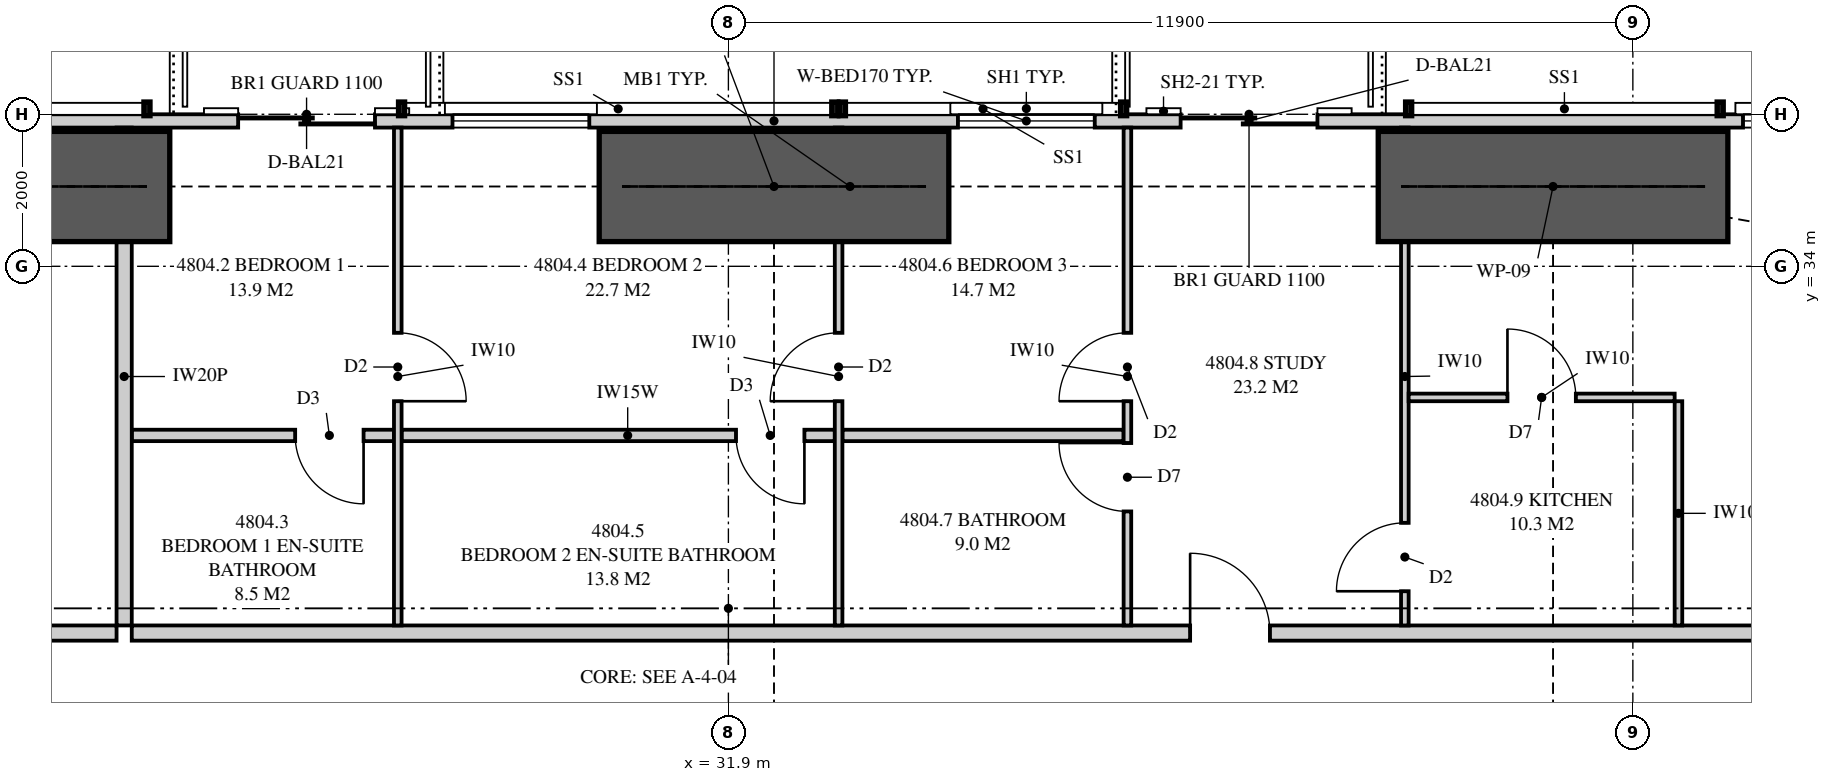
"""IFC4 building model, lengths in metres.
Left out: names, types, materials, properties, quantities, classifications, styles, units other than length and angle.
Written with IfcOpenShell. Run it as: python <this file> out.ifc"""

import sys

from ifc_helpers import new_model, si_unit, direction, frame, frame_2d, origin, place, context, subcontext, project, spatial, polyline, rectangle, outline, extrude, element, fill, save


model = new_model("IFC4")
c1 = context("Model", 3, precision=1e-05, world=origin(), true_north=direction((0.0, 1.0)))
c2 = subcontext(c1, "Body", "Model", "MODEL_VIEW")
j1 = project(units=[si_unit("LENGTHUNIT", "METRE"), si_unit("PLANEANGLEUNIT", "RADIAN")], contexts=[c1])
p1 = place(None, origin())
s1 = spatial("IfcSite", under=j1, at=p1, CompositionType="ELEMENT")
p2 = place(p1, origin())
s2 = spatial("IfcBuilding", under=s1, at=p2, CompositionType="ELEMENT")
p3 = place(p2, frame((0.0, 0.0, 177.8)))
s3 = spatial("IfcBuildingStorey", under=s2, at=p3, CompositionType="ELEMENT", Elevation=177.8)
p4 = place(p3, frame((49.949, 35.913, 0.0), z_axis=(0.0, 0.0, 1.0), x_axis=(-1.0, 0.0, 0.0)))
e1 = element("IfcWall", 1, at=p4, inside=s3, PredefinedType="SOLIDWALL", context=c2, shape_type="SweptSolid", body=[
    extrude(outline(polyline([(0.0, 0.0), (34.897, 0.0), (34.897, 3.11), (27.91, 3.11), (27.91, 2.15), (27.836, 2.15), (27.836, 3.11), (27.699, 3.11), (27.699, 2.15), (7.199, 2.15), (7.199, 3.11), (7.062, 3.11), (7.062, 2.15), (6.987, 2.15), (6.987, 3.11), (0.0, 3.11), (0.0, 0.0)])), frame((0.0, 0.087, 0.0), z_axis=(0.0, -1.0, 0.0), x_axis=(1.0, 0.0, 0.0)), (0.0, 0.0, 1.0), 0.175),
])
p5 = place(p4, frame((2.3, 0.0, 0.4)))
e2 = element("IfcOpeningElement", 2, at=p5, cuts=e1, PredefinedType="OPENING", context=c2, shape_type="SweptSolid", body=[
    extrude(rectangle(XDim=2.4, YDim=1.7, at=frame_2d((1.2, 0.85))), frame((0.0, 0.097, 0.0), z_axis=(0.0, -1.0, 0.0), x_axis=(1.0, 0.0, 0.0)), (0.0, 0.0, 1.0), 0.195),
])
p6 = place(p4, frame((10.299, 0.0, 0.0)))
e3 = element("IfcOpeningElement", 3, at=p6, cuts=e1, PredefinedType="OPENING", context=c2, shape_type="SweptSolid", body=[
    extrude(rectangle(XDim=1.8, YDim=2.1, at=frame_2d((0.9, 1.05))), frame((0.0, 0.097, 0.0), z_axis=(0.0, -1.0, 0.0), x_axis=(1.0, 0.0, 0.0)), (0.0, 0.0, 1.0), 0.195),
])
p7 = place(p4, frame((13.229, 0.0, 0.4)))
e4 = element("IfcOpeningElement", 4, at=p7, cuts=e1, PredefinedType="OPENING", context=c2, shape_type="SweptSolid", body=[
    extrude(rectangle(XDim=1.8, YDim=1.7, at=frame_2d((0.9, 0.85))), frame((0.0, 0.097, 0.0), z_axis=(0.0, -1.0, 0.0), x_axis=(1.0, 0.0, 0.0)), (0.0, 0.0, 1.0), 0.195),
])
p8 = place(p4, frame((19.879, 0.0, 0.4)))
e5 = element("IfcOpeningElement", 5, at=p8, cuts=e1, PredefinedType="OPENING", context=c2, shape_type="SweptSolid", body=[
    extrude(rectangle(XDim=1.8, YDim=1.7, at=frame_2d((0.9, 0.85))), frame((0.0, 0.097, 0.0), z_axis=(0.0, -1.0, 0.0), x_axis=(1.0, 0.0, 0.0)), (0.0, 0.0, 1.0), 0.195),
])
p9 = place(p4, frame((22.699, 0.0, 0.0)))
e6 = element("IfcOpeningElement", 6, at=p9, cuts=e1, PredefinedType="OPENING", context=c2, shape_type="SweptSolid", body=[
    extrude(rectangle(XDim=1.8, YDim=2.1, at=frame_2d((0.9, 1.05))), frame((0.0, 0.097, 0.0), z_axis=(0.0, -1.0, 0.0), x_axis=(1.0, 0.0, 0.0)), (0.0, 0.0, 1.0), 0.195),
])
p10 = place(p4, frame((30.243, 0.0, 0.4)))
e7 = element("IfcOpeningElement", 7, at=p10, cuts=e1, PredefinedType="OPENING", context=c2, shape_type="SweptSolid", body=[
    extrude(rectangle(XDim=1.2, YDim=1.7, at=frame_2d((0.6, 0.85))), frame((0.0, 0.097, 0.0), z_axis=(0.0, -1.0, 0.0), x_axis=(1.0, 0.0, 0.0)), (0.0, 0.0, 1.0), 0.195),
])
p11 = place(p3, frame((23.95, 35.825, 0.0), z_axis=(0.0, 0.0, 1.0), x_axis=(0.0, -1.0, 0.0)))
e8 = element("IfcWall", 8, at=p11, inside=s3, PredefinedType="PARTITIONING", context=c2, shape_type="SweptSolid", body=[
    extrude(outline(polyline([(0.529, 2.15), (0.0, 2.15), (0.0, 0.0), (0.529, 0.0), (0.529, 0.123), (1.021, 0.123), (1.021, 0.0), (6.55, 0.0), (6.55, 3.11), (1.685, 3.11), (1.685, 2.15), (1.021, 2.15), (1.021, 2.027), (0.529, 2.027), (0.529, 2.15)])), frame((0.0, 0.1, 0.0), z_axis=(0.0, -1.0, 0.0), x_axis=(1.0, 0.0, 0.0)), (0.0, 0.0, 1.0), 0.2),
])
p12 = place(p3, frame((17.85, 29.175, 0.0), z_axis=(0.0, 0.0, 1.0), x_axis=(1.0, 0.0, 0.0)))
e9 = element("IfcWall", 9, at=p12, inside=s3, PredefinedType="PARTITIONING", context=c2, shape_type="SweptSolid", body=[
    extrude(outline(polyline([(0.0, 0.0), (6.0, 0.0), (6.0, 3.11), (4.737, 3.11), (4.737, 2.541), (4.062, 2.541), (4.062, 3.11), (0.0, 3.11), (0.0, 0.0)])), frame((0.0, 0.1, 0.0), z_axis=(0.0, -1.0, 0.0), x_axis=(1.0, 0.0, 0.0)), (0.0, 0.0, 1.0), 0.2),
])
p13 = place(p12, frame((2.1, 0.0, 0.0)))
e10 = element("IfcOpeningElement", 10, at=p13, cuts=e9, PredefinedType="OPENING", context=c2, shape_type="SweptSolid", body=[
    extrude(rectangle(XDim=1.8, YDim=2.1, at=frame_2d((0.9, 1.05))), frame((0.0, 0.11, 0.0), z_axis=(0.0, -1.0, 0.0), x_axis=(1.0, 0.0, 0.0)), (0.0, 0.0, 1.0), 0.22),
])
p14 = place(p3, frame((24.05, 29.175, 0.0), z_axis=(0.0, 0.0, 1.0), x_axis=(1.0, 0.0, 0.0)))
e11 = element("IfcWall", 11, at=p14, inside=s3, PredefinedType="PARTITIONING", context=c2, shape_type="SweptSolid", body=[
    extrude(outline(polyline([(0.0, 0.0), (21.9, 0.0), (21.9, 3.11), (19.037, 3.11), (19.037, 2.541), (18.363, 2.541), (18.363, 3.11), (8.787, 3.11), (8.787, 2.541), (8.113, 2.541), (8.113, 3.11), (0.0, 3.11), (0.0, 0.0)])), frame((0.0, 0.1, 0.0), z_axis=(0.0, -1.0, 0.0), x_axis=(1.0, 0.0, 0.0)), (0.0, 0.0, 1.0), 0.2),
])
p15 = place(p14, frame((13.925, 0.0, 0.0)))
e12 = element("IfcOpeningElement", 12, at=p15, cuts=e11, PredefinedType="OPENING", context=c2, shape_type="SweptSolid", body=[
    extrude(rectangle(XDim=1.05, YDim=2.2, at=frame_2d((0.525, 1.1))), frame((0.0, 0.11, 0.0), z_axis=(0.0, -1.0, 0.0), x_axis=(1.0, 0.0, 0.0)), (0.0, 0.0, 1.0), 0.22),
])
p16 = place(p3, frame((27.55, 35.825, 0.0), z_axis=(0.0, 0.0, 1.0), x_axis=(0.0, -1.0, 0.0)))
e13 = element("IfcWall", 13, at=p16, inside=s3, PredefinedType="PARTITIONING", context=c2, shape_type="SweptSolid", body=[
    extrude(outline(polyline([(0.0, 0.0), (6.55, 0.0), (6.55, 3.11), (1.635, 3.11), (1.635, 2.15), (0.0, 2.15), (0.0, 3.11), (0.0, 0.0)])), frame((0.0, 0.05, 0.0), z_axis=(0.0, -1.0, 0.0), x_axis=(1.0, 0.0, 0.0)), (0.0, 0.0, 1.0), 0.1),
])
p17 = place(p16, frame((2.7, 0.0, 0.0)))
e14 = element("IfcOpeningElement", 14, at=p17, cuts=e13, PredefinedType="OPENING", context=c2, shape_type="SweptSolid", body=[
    extrude(rectangle(XDim=0.9, YDim=2.1, at=frame_2d((0.45, 1.05))), frame((0.0, 0.06, 0.0), z_axis=(0.0, -1.0, 0.0), x_axis=(1.0, 0.0, 0.0)), (0.0, 0.0, 1.0), 0.12),
])
p18 = place(p3, frame((33.35, 35.825, 0.0), z_axis=(0.0, 0.0, 1.0), x_axis=(0.0, -1.0, 0.0)))
e15 = element("IfcWall", 15, at=p18, inside=s3, PredefinedType="PARTITIONING", context=c2, shape_type="SweptSolid", body=[
    extrude(outline(polyline([(0.529, 2.15), (0.0, 2.15), (0.0, 0.0), (0.529, 0.0), (0.529, 0.793), (1.021, 0.793), (1.021, 0.0), (6.55, 0.0), (6.55, 3.11), (1.635, 3.11), (1.635, 2.15), (1.021, 2.15), (1.021, 1.357), (0.529, 1.357), (0.529, 2.15)])), frame((0.0, 0.05, 0.0), z_axis=(0.0, -1.0, 0.0), x_axis=(1.0, 0.0, 0.0)), (0.0, 0.0, 1.0), 0.1),
])
p19 = place(p18, frame((2.7, 0.0, 0.0)))
e16 = element("IfcOpeningElement", 16, at=p19, cuts=e15, PredefinedType="OPENING", context=c2, shape_type="SweptSolid", body=[
    extrude(rectangle(XDim=0.9, YDim=2.1, at=frame_2d((0.45, 1.05))), frame((0.0, 0.06, 0.0), z_axis=(0.0, -1.0, 0.0), x_axis=(1.0, 0.0, 0.0)), (0.0, 0.0, 1.0), 0.12),
])
p20 = place(p3, frame((37.15, 35.825, 0.0), z_axis=(0.0, 0.0, 1.0), x_axis=(0.0, -1.0, 0.0)))
e17 = element("IfcWall", 17, at=p20, inside=s3, PredefinedType="PARTITIONING", context=c2, shape_type="SweptSolid", body=[
    extrude(outline(polyline([(0.0, 0.0), (6.55, 0.0), (6.55, 3.11), (1.635, 3.11), (1.635, 2.15), (0.0, 2.15), (0.0, 3.11), (0.0, 0.0)])), frame((0.0, 0.05, 0.0), z_axis=(0.0, -1.0, 0.0), x_axis=(1.0, 0.0, 0.0)), (0.0, 0.0, 1.0), 0.1),
])
p21 = place(p20, frame((2.7, 0.0, 0.0)))
e18 = element("IfcOpeningElement", 18, at=p21, cuts=e17, PredefinedType="OPENING", context=c2, shape_type="SweptSolid", body=[
    extrude(rectangle(XDim=0.9, YDim=2.1, at=frame_2d((0.45, 1.05))), frame((0.0, 0.06, 0.0), z_axis=(0.0, -1.0, 0.0), x_axis=(1.0, 0.0, 0.0)), (0.0, 0.0, 1.0), 0.12),
])
p22 = place(p20, frame((4.15, 0.0, 0.0)))
e19 = element("IfcOpeningElement", 19, at=p22, cuts=e17, PredefinedType="OPENING", context=c2, shape_type="SweptSolid", body=[
    extrude(rectangle(XDim=0.9, YDim=2.1, at=frame_2d((0.45, 1.05))), frame((0.0, 0.06, 0.0), z_axis=(0.0, -1.0, 0.0), x_axis=(1.0, 0.0, 0.0)), (0.0, 0.0, 1.0), 0.12),
])
p23 = place(p3, frame((24.05, 31.775, 0.0), z_axis=(0.0, 0.0, 1.0), x_axis=(1.0, 0.0, 0.0)))
e20 = element("IfcWall", 20, at=p23, inside=s3, PredefinedType="PLUMBINGWALL", context=c2, shape_type="SweptSolid", body=[
    extrude(rectangle(XDim=3.45, YDim=0.15, at=frame_2d((1.725, 0.0))), origin(), (0.0, 0.0, 1.0), 3.11),
])
p24 = place(p23, frame((2.15, 0.0, 0.0)))
e21 = element("IfcOpeningElement", 21, at=p24, cuts=e20, PredefinedType="OPENING", context=c2, shape_type="SweptSolid", body=[
    extrude(rectangle(XDim=0.9, YDim=2.1, at=frame_2d((0.45, 1.05))), frame((0.0, 0.085, 0.0), z_axis=(0.0, -1.0, 0.0), x_axis=(1.0, 0.0, 0.0)), (0.0, 0.0, 1.0), 0.17),
])
p25 = place(p3, frame((27.6, 31.775, 0.0), z_axis=(0.0, 0.0, 1.0), x_axis=(1.0, 0.0, 0.0)))
e22 = element("IfcWall", 22, at=p25, inside=s3, PredefinedType="PLUMBINGWALL", context=c2, shape_type="SweptSolid", body=[
    extrude(outline(polyline([(0.0, 0.0), (5.7, 0.0), (5.7, 3.11), (5.212, 3.11), (5.212, 2.541), (4.588, 2.541), (4.588, 3.11), (0.0, 3.11), (0.0, 0.0)])), frame((0.0, 0.075, 0.0), z_axis=(0.0, -1.0, 0.0), x_axis=(1.0, 0.0, 0.0)), (0.0, 0.0, 1.0), 0.15),
])
p26 = place(p25, frame((4.4, 0.0, 0.0)))
e23 = element("IfcOpeningElement", 23, at=p26, cuts=e22, PredefinedType="OPENING", context=c2, shape_type="SweptSolid", body=[
    extrude(rectangle(XDim=0.9, YDim=2.1, at=frame_2d((0.45, 1.05))), frame((0.0, 0.085, 0.0), z_axis=(0.0, -1.0, 0.0), x_axis=(1.0, 0.0, 0.0)), (0.0, 0.0, 1.0), 0.17),
])
p27 = place(p3, frame((33.4, 31.775, 0.0), z_axis=(0.0, 0.0, 1.0), x_axis=(1.0, 0.0, 0.0)))
e24 = element("IfcWall", 24, at=p27, inside=s3, PredefinedType="PLUMBINGWALL", context=c2, shape_type="SweptSolid", body=[
    extrude(rectangle(XDim=3.7, YDim=0.15, at=frame_2d((1.85, 0.0))), origin(), (0.0, 0.0, 1.0), 3.11),
])
p28 = place(p3, frame((40.8, 35.825, 0.0), z_axis=(0.0, 0.0, 1.0), x_axis=(0.0, -1.0, 0.0)))
e25 = element("IfcWall", 25, at=p28, inside=s3, PredefinedType="PARTITIONING", context=c2, shape_type="SweptSolid", body=[
    extrude(outline(polyline([(0.0, 0.0), (6.55, 0.0), (6.55, 3.11), (1.635, 3.11), (1.635, 2.15), (0.0, 2.15), (0.0, 3.11), (0.0, 0.0)])), frame((0.0, 0.05, 0.0), z_axis=(0.0, -1.0, 0.0), x_axis=(1.0, 0.0, 0.0)), (0.0, 0.0, 1.0), 0.1),
])
p29 = place(p28, frame((5.2, 0.0, 0.0)))
e26 = element("IfcOpeningElement", 26, at=p29, cuts=e25, PredefinedType="OPENING", context=c2, shape_type="SweptSolid", body=[
    extrude(rectangle(XDim=0.9, YDim=2.1, at=frame_2d((0.45, 1.05))), frame((0.0, 0.06, 0.0), z_axis=(0.0, -1.0, 0.0), x_axis=(1.0, 0.0, 0.0)), (0.0, 0.0, 1.0), 0.12),
])
p30 = place(p3, frame((40.85, 32.275, 0.0), z_axis=(0.0, 0.0, 1.0), x_axis=(1.0, 0.0, 0.0)))
e27 = element("IfcWall", 27, at=p30, inside=s3, PredefinedType="PARTITIONING", context=c2, shape_type="SweptSolid", body=[
    extrude(outline(polyline([(0.0, 0.0), (3.5, 0.0), (3.5, 3.11), (2.188, 3.11), (2.188, 2.541), (1.613, 2.541), (1.613, 3.11), (0.0, 3.11), (0.0, 0.0)])), frame((0.0, 0.05, 0.0), z_axis=(0.0, -1.0, 0.0), x_axis=(1.0, 0.0, 0.0)), (0.0, 0.0, 1.0), 0.1),
])
p31 = place(p30, frame((1.3, 0.0, 0.0)))
e28 = element("IfcOpeningElement", 28, at=p31, cuts=e27, PredefinedType="OPENING", context=c2, shape_type="SweptSolid", body=[
    extrude(rectangle(XDim=0.9, YDim=2.1, at=frame_2d((0.45, 1.05))), frame((0.0, 0.06, 0.0), z_axis=(0.0, -1.0, 0.0), x_axis=(1.0, 0.0, 0.0)), (0.0, 0.0, 1.0), 0.12),
])
p32 = place(p3, frame((44.4, 32.225, 0.0), z_axis=(0.0, 0.0, 1.0), x_axis=(0.0, -1.0, 0.0)))
e29 = element("IfcWall", 29, at=p32, inside=s3, PredefinedType="PARTITIONING", context=c2, shape_type="SweptSolid", body=[
    extrude(rectangle(XDim=2.95, YDim=0.1, at=frame_2d((1.475, 0.0))), origin(), (0.0, 0.0, 1.0), 3.11),
])
for number, where, z_axis, x_axis in (
    (30, (40.45, 35.05, 0.0), (0.0, 0.0, 1.0), (1.0, 0.0, 0.0)),
    (31, (30.2, 35.05, 0.0), (0.0, 0.0, 1.0), (1.0, 0.0, 0.0)),
    (32, (19.95, 35.05, 0.0), (0.0, 0.0, 1.0), (1.0, 0.0, 0.0)),
):
    element("IfcWall", number, at=place(p3, frame(where, z_axis=z_axis, x_axis=x_axis)), inside=s3, PredefinedType="SHEAR", context=c2, shape_type="SweptSolid", body=[
        extrude(rectangle(XDim=4.6, YDim=1.45, at=frame_2d((2.3, 0.0))), origin(), (0.0, 0.0, 1.0), 3.35),
    ])
p33 = place(p5, origin())
e33 = element("IfcWindow", 33, at=p33, inside=s3, PartitioningType="SINGLE_PANEL", PredefinedType="WINDOW", context=c2, shape_type="SweptSolid", body=[
    extrude(rectangle(XDim=2.4, YDim=1.7, at=frame_2d((1.2, 0.85))), frame((0.0, 0.03, 0.0), z_axis=(0.0, -1.0, 0.0), x_axis=(1.0, 0.0, 0.0)), (0.0, 0.0, 1.0), 0.06),
])
fill(e2, e33)
p34 = place(p6, origin())
e34 = element("IfcDoor", 34, at=p34, inside=s3, OperationType="SLIDING_TO_LEFT", PredefinedType="DOOR", context=c2, shape_type="SweptSolid", body=[
    extrude(rectangle(XDim=1.8, YDim=2.1, at=frame_2d((0.9, 1.05))), frame((0.0, 0.025, 0.0), z_axis=(0.0, -1.0, 0.0), x_axis=(1.0, 0.0, 0.0)), (0.0, 0.0, 1.0), 0.05),
])
fill(e3, e34)
p35 = place(p7, origin())
e35 = element("IfcWindow", 35, at=p35, inside=s3, PartitioningType="SINGLE_PANEL", PredefinedType="WINDOW", context=c2, shape_type="SweptSolid", body=[
    extrude(rectangle(XDim=1.8, YDim=1.7, at=frame_2d((0.9, 0.85))), frame((0.0, 0.03, 0.0), z_axis=(0.0, -1.0, 0.0), x_axis=(1.0, 0.0, 0.0)), (0.0, 0.0, 1.0), 0.06),
])
fill(e4, e35)
p36 = place(p8, origin())
e36 = element("IfcWindow", 36, at=p36, inside=s3, PartitioningType="SINGLE_PANEL", PredefinedType="WINDOW", context=c2, shape_type="SweptSolid", body=[
    extrude(rectangle(XDim=1.8, YDim=1.7, at=frame_2d((0.9, 0.85))), frame((0.0, 0.03, 0.0), z_axis=(0.0, -1.0, 0.0), x_axis=(1.0, 0.0, 0.0)), (0.0, 0.0, 1.0), 0.06),
])
fill(e5, e36)
p37 = place(p9, origin())
e37 = element("IfcDoor", 37, at=p37, inside=s3, OperationType="SLIDING_TO_LEFT", PredefinedType="DOOR", context=c2, shape_type="SweptSolid", body=[
    extrude(rectangle(XDim=1.8, YDim=2.1, at=frame_2d((0.9, 1.05))), frame((0.0, 0.025, 0.0), z_axis=(0.0, -1.0, 0.0), x_axis=(1.0, 0.0, 0.0)), (0.0, 0.0, 1.0), 0.05),
])
fill(e6, e37)
p38 = place(p15, origin())
e38 = element("IfcDoor", 38, at=p38, inside=s3, OperationType="SINGLE_SWING_LEFT", PredefinedType="DOOR", context=c2, shape_type="SweptSolid", body=[
    extrude(rectangle(XDim=1.05, YDim=2.2, at=frame_2d((0.525, 1.1))), frame((0.0, 0.025, 0.0), z_axis=(0.0, -1.0, 0.0), x_axis=(1.0, 0.0, 0.0)), (0.0, 0.0, 1.0), 0.05),
])
fill(e12, e38)
p39 = place(p17, origin())
e39 = element("IfcDoor", 39, at=p39, inside=s3, OperationType="SINGLE_SWING_RIGHT", PredefinedType="DOOR", context=c2, shape_type="SweptSolid", body=[
    extrude(rectangle(XDim=0.9, YDim=2.1, at=frame_2d((0.45, 1.05))), frame((0.0, 0.025, 0.0), z_axis=(0.0, -1.0, 0.0), x_axis=(1.0, 0.0, 0.0)), (0.0, 0.0, 1.0), 0.05),
])
fill(e14, e39)
p40 = place(p24, frame((0.9, 0.0, 0.0), z_axis=(0.0, 0.0, 1.0), x_axis=(-1.0, 0.0, 0.0)))
e40 = element("IfcDoor", 40, at=p40, inside=s3, OperationType="SINGLE_SWING_LEFT", PredefinedType="DOOR", context=c2, shape_type="SweptSolid", body=[
    extrude(rectangle(XDim=0.9, YDim=2.1, at=frame_2d((0.45, 1.05))), frame((0.0, 0.025, 0.0), z_axis=(0.0, -1.0, 0.0), x_axis=(1.0, 0.0, 0.0)), (0.0, 0.0, 1.0), 0.05),
])
fill(e21, e40)
p41 = place(p19, frame((0.9, 0.0, 0.0), z_axis=(0.0, 0.0, 1.0), x_axis=(-1.0, 0.0, 0.0)))
e41 = element("IfcDoor", 41, at=p41, inside=s3, OperationType="SINGLE_SWING_LEFT", PredefinedType="DOOR", context=c2, shape_type="SweptSolid", body=[
    extrude(rectangle(XDim=0.9, YDim=2.1, at=frame_2d((0.45, 1.05))), frame((0.0, 0.025, 0.0), z_axis=(0.0, -1.0, 0.0), x_axis=(1.0, 0.0, 0.0)), (0.0, 0.0, 1.0), 0.05),
])
fill(e16, e41)
p42 = place(p26, frame((0.9, 0.0, 0.0), z_axis=(0.0, 0.0, 1.0), x_axis=(-1.0, 0.0, 0.0)))
e42 = element("IfcDoor", 42, at=p42, inside=s3, OperationType="SINGLE_SWING_LEFT", PredefinedType="DOOR", context=c2, shape_type="SweptSolid", body=[
    extrude(rectangle(XDim=0.9, YDim=2.1, at=frame_2d((0.45, 1.05))), frame((0.0, 0.025, 0.0), z_axis=(0.0, -1.0, 0.0), x_axis=(1.0, 0.0, 0.0)), (0.0, 0.0, 1.0), 0.05),
])
fill(e23, e42)
p43 = place(p21, frame((0.9, 0.0, 0.0), z_axis=(0.0, 0.0, 1.0), x_axis=(-1.0, 0.0, 0.0)))
e43 = element("IfcDoor", 43, at=p43, inside=s3, OperationType="SINGLE_SWING_LEFT", PredefinedType="DOOR", context=c2, shape_type="SweptSolid", body=[
    extrude(rectangle(XDim=0.9, YDim=2.1, at=frame_2d((0.45, 1.05))), frame((0.0, 0.025, 0.0), z_axis=(0.0, -1.0, 0.0), x_axis=(1.0, 0.0, 0.0)), (0.0, 0.0, 1.0), 0.05),
])
fill(e18, e43)
p44 = place(p22, frame((0.9, 0.0, 0.0), z_axis=(0.0, 0.0, 1.0), x_axis=(-1.0, 0.0, 0.0)))
e44 = element("IfcDoor", 44, at=p44, inside=s3, OperationType="SINGLE_SWING_RIGHT", PredefinedType="DOOR", context=c2, shape_type="SweptSolid", body=[
    extrude(rectangle(XDim=0.9, YDim=2.1, at=frame_2d((0.45, 1.05))), frame((0.0, 0.025, 0.0), z_axis=(0.0, -1.0, 0.0), x_axis=(1.0, 0.0, 0.0)), (0.0, 0.0, 1.0), 0.05),
])
fill(e19, e44)
p45 = place(p29, frame((0.9, 0.0, 0.0), z_axis=(0.0, 0.0, 1.0), x_axis=(-1.0, 0.0, 0.0)))
e45 = element("IfcDoor", 45, at=p45, inside=s3, OperationType="SINGLE_SWING_LEFT", PredefinedType="DOOR", context=c2, shape_type="SweptSolid", body=[
    extrude(rectangle(XDim=0.9, YDim=2.1, at=frame_2d((0.45, 1.05))), frame((0.0, 0.025, 0.0), z_axis=(0.0, -1.0, 0.0), x_axis=(1.0, 0.0, 0.0)), (0.0, 0.0, 1.0), 0.05),
])
fill(e26, e45)
p46 = place(p31, origin())
e46 = element("IfcDoor", 46, at=p46, inside=s3, OperationType="SINGLE_SWING_LEFT", PredefinedType="DOOR", context=c2, shape_type="SweptSolid", body=[
    extrude(rectangle(XDim=0.9, YDim=2.1, at=frame_2d((0.45, 1.05))), frame((0.0, 0.025, 0.0), z_axis=(0.0, -1.0, 0.0), x_axis=(1.0, 0.0, 0.0)), (0.0, 0.0, 1.0), 0.05),
])
fill(e28, e46)
save(model, sys.argv[1])
